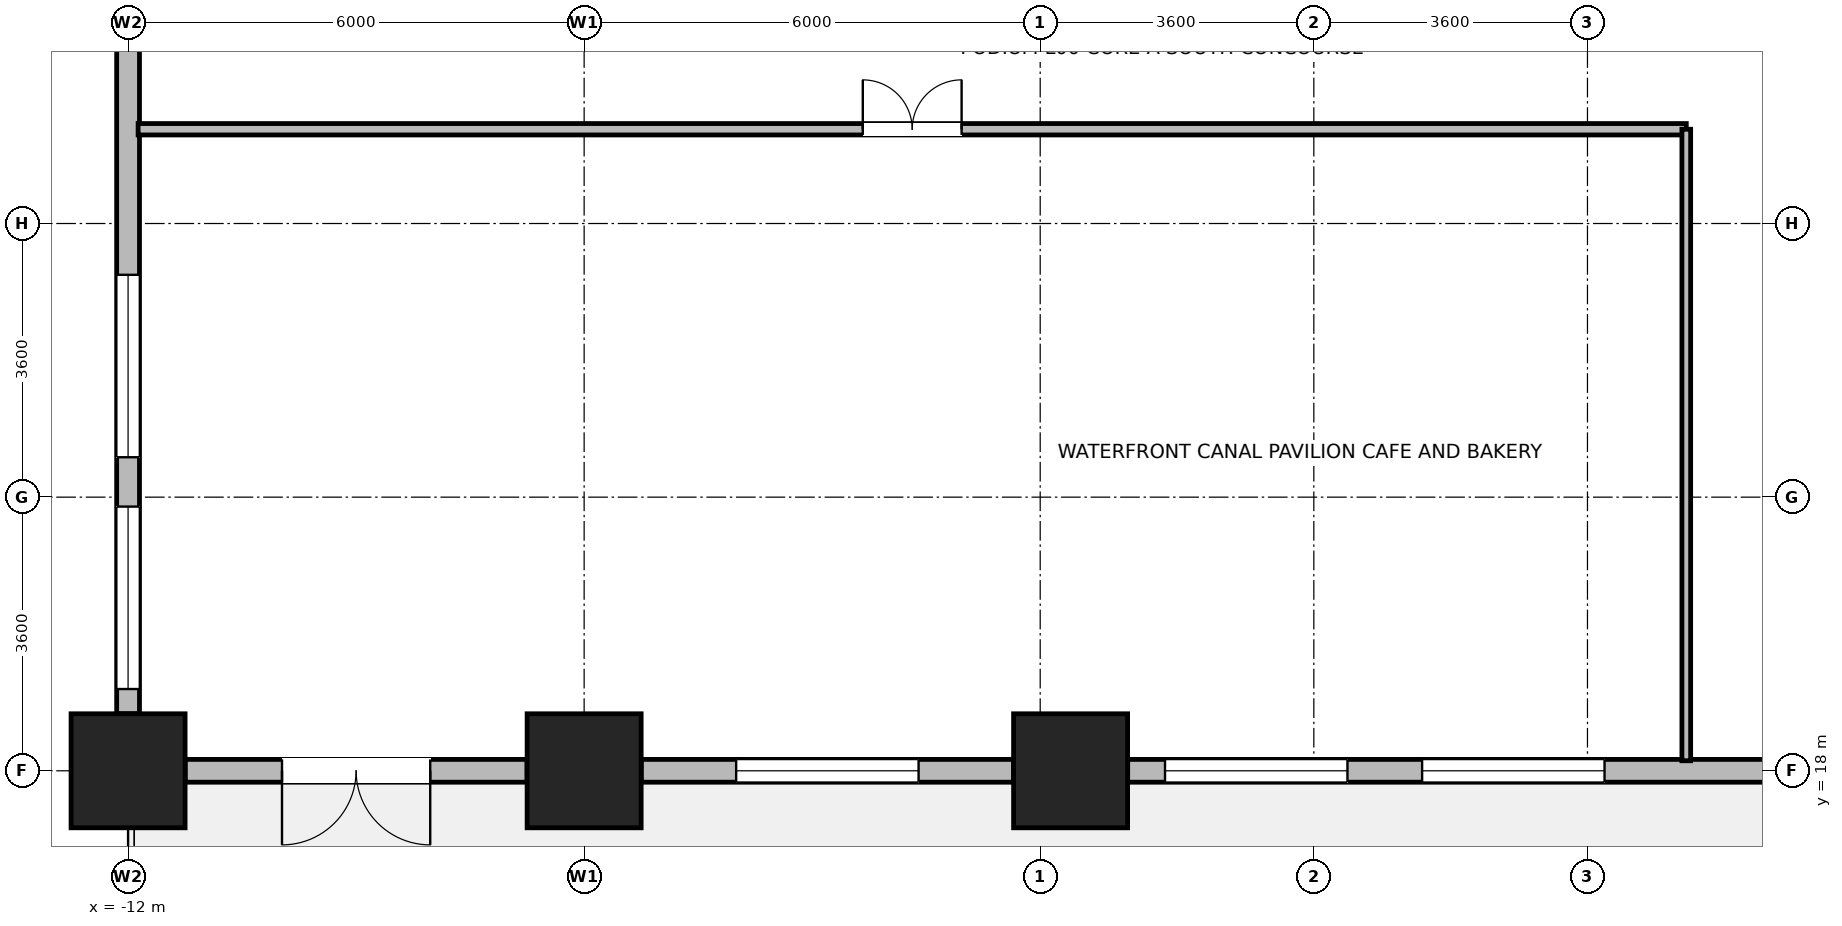
"""IFC4 building model, lengths in metres.
Left out: names, types, materials, properties, quantities, classifications, styles, units other than length and angle.
Written with IfcOpenShell. Run it as: python <this file> out.ifc"""

import sys

from ifc_helpers import new_model, si_unit, direction, frame, frame_2d, origin, origin_2d, place, context, subcontext, project, spatial, rectangle, extrude, source, transform, mapped, element, fill, save


model = new_model("IFC4")
c1 = context("Model", 3, precision=1e-05, world=origin(), true_north=direction((0.0, 1.0)))
c2 = subcontext(c1, "Body", "Model", "MODEL_VIEW")
j1 = project(units=[si_unit("LENGTHUNIT", "METRE"), si_unit("PLANEANGLEUNIT", "RADIAN")], contexts=[c1])
p1 = place(None, origin())
s1 = spatial("IfcSite", under=j1, at=p1, CompositionType="ELEMENT")
p2 = place(p1, origin())
s2 = spatial("IfcBuilding", under=s1, at=p2, CompositionType="ELEMENT")
p3 = place(p2, origin())
s3 = spatial("IfcBuildingStorey", under=s2, at=p3, CompositionType="ELEMENT", Elevation=0.0)
m1 = source(origin(), c2, "Body", "SweptSolid", [
    extrude(rectangle(XDim=1.5, YDim=1.5, at=origin_2d()), origin(), (0.0, 0.0, 1.0), 5.4),
])
for number, where, z_axis, x_axis in (
    (1, (0.4, 18.0, 0.0), (0.0, 0.0, 1.0), (1.0, 0.0, 0.0)),
    (2, (-12.0, 18.0, 0.0), (0.0, 0.0, 1.0), (1.0, 0.0, 0.0)),
    (3, (-6.0, 18.0, 0.0), (0.0, 0.0, 1.0), (1.0, 0.0, 0.0)),
):
    element("IfcColumn", number, at=place(p3, frame(where, z_axis=z_axis, x_axis=x_axis)), inside=s3, PredefinedType="COLUMN", context=c2, shape_type="MappedRepresentation", body=[
        mapped(m1, transform((0.0, 0.0, 0.0), x_axis=(1.0, 0.0, 0.0), y_axis=(0.0, 1.0, 0.0), z_axis=(0.0, 0.0, 1.0), scale=1.0)),
    ])
p4 = place(p3, frame((-12.0, 18.751, 0.0), z_axis=(0.0, 0.0, 1.0), x_axis=(0.0, 1.0, 0.0)))
e4 = element("IfcWall", 4, at=p4, inside=s3, PredefinedType="STANDARD", context=c2, shape_type="SweptSolid", body=[
    extrude(rectangle(XDim=9.148, YDim=0.3, at=frame_2d((4.574, 0.0))), origin(), (0.0, 0.0, 1.0), 4.5),
])
p5 = place(p4, frame((0.325, 0.0, 0.9)))
e5 = element("IfcOpeningElement", 5, at=p5, cuts=e4, PredefinedType="OPENING", context=c2, shape_type="SweptSolid", body=[
    extrude(rectangle(XDim=2.4, YDim=2.5, at=frame_2d((1.2, 1.25))), frame((0.0, 0.16, 0.0), z_axis=(0.0, -1.0, 0.0), x_axis=(1.0, 0.0, 0.0)), (0.0, 0.0, 1.0), 0.32),
])
p6 = place(p4, frame((3.374, 0.0, 0.9)))
e6 = element("IfcOpeningElement", 6, at=p6, cuts=e4, PredefinedType="OPENING", context=c2, shape_type="SweptSolid", body=[
    extrude(rectangle(XDim=2.4, YDim=2.5, at=frame_2d((1.2, 1.25))), frame((0.0, 0.16, 0.0), z_axis=(0.0, -1.0, 0.0), x_axis=(1.0, 0.0, 0.0)), (0.0, 0.0, 1.0), 0.32),
])
p7 = place(p3, frame((-6.751, 18.0, 0.0), z_axis=(0.0, 0.0, 1.0), x_axis=(-1.0, 0.0, 0.0)))
e7 = element("IfcWall", 7, at=p7, inside=s3, PredefinedType="STANDARD", context=c2, shape_type="SweptSolid", body=[
    extrude(rectangle(XDim=4.498, YDim=0.3, at=frame_2d((2.249, 0.0))), origin(), (0.0, 0.0, 1.0), 4.4),
])
p8 = place(p7, frame((1.274, 0.0, 0.0)))
e8 = element("IfcOpeningElement", 8, at=p8, cuts=e7, PredefinedType="OPENING", context=c2, shape_type="SweptSolid", body=[
    extrude(rectangle(XDim=1.95, YDim=2.4, at=frame_2d((0.975, 1.2))), frame((0.0, 0.16, 0.0), z_axis=(0.0, -1.0, 0.0), x_axis=(1.0, 0.0, 0.0)), (0.0, 0.0, 1.0), 0.32),
])
p9 = place(p3, frame((-0.351, 18.0, 0.0), z_axis=(0.0, 0.0, 1.0), x_axis=(-1.0, 0.0, 0.0)))
e9 = element("IfcWall", 9, at=p9, inside=s3, PredefinedType="STANDARD", context=c2, shape_type="SweptSolid", body=[
    extrude(rectangle(XDim=4.898, YDim=0.3, at=frame_2d((2.449, 0.0))), origin(), (0.0, 0.0, 1.0), 4.4),
])
p10 = place(p9, frame((1.249, 0.0, 0.9)))
e10 = element("IfcOpeningElement", 10, at=p10, cuts=e9, PredefinedType="OPENING", context=c2, shape_type="SweptSolid", body=[
    extrude(rectangle(XDim=2.4, YDim=2.5, at=frame_2d((1.2, 1.25))), frame((0.0, 0.16, 0.0), z_axis=(0.0, -1.0, 0.0), x_axis=(1.0, 0.0, 0.0)), (0.0, 0.0, 1.0), 0.32),
])
p11 = place(p3, frame((21.445, 18.0, 0.0), z_axis=(0.0, 0.0, 1.0), x_axis=(-1.0, 0.0, 0.0)))
e11 = element("IfcWall", 11, at=p11, inside=s3, PredefinedType="STANDARD", context=c2, shape_type="SweptSolid", body=[
    extrude(rectangle(XDim=20.294, YDim=0.3, at=frame_2d((10.147, 0.0))), origin(), (0.0, 0.0, 1.0), 5.1),
])
p12 = place(p11, frame((4.02, 0.0, 0.0)))
e12 = element("IfcOpeningElement", 12, at=p12, cuts=e11, PredefinedType="OPENING", context=c2, shape_type="SweptSolid", body=[
    extrude(rectangle(XDim=1.85, YDim=2.25, at=frame_2d((0.925, 1.125))), frame((0.0, 0.16, 0.0), z_axis=(0.0, -1.0, 0.0), x_axis=(1.0, 0.0, 0.0)), (0.0, 0.0, 1.0), 0.32),
])
p13 = place(p11, frame((1.12, 0.0, 0.0)))
e13 = element("IfcOpeningElement", 13, at=p13, cuts=e11, PredefinedType="OPENING", context=c2, shape_type="SweptSolid", body=[
    extrude(rectangle(XDim=1.95, YDim=2.4, at=frame_2d((0.975, 1.2))), frame((0.0, 0.16, 0.0), z_axis=(0.0, -1.0, 0.0), x_axis=(1.0, 0.0, 0.0)), (0.0, 0.0, 1.0), 0.32),
])
p14 = place(p11, frame((7.256, 0.0, 0.9)))
e14 = element("IfcOpeningElement", 14, at=p14, cuts=e11, PredefinedType="OPENING", context=c2, shape_type="SweptSolid", body=[
    extrude(rectangle(XDim=2.4, YDim=2.5, at=frame_2d((1.2, 1.25))), frame((0.0, 0.16, 0.0), z_axis=(0.0, -1.0, 0.0), x_axis=(1.0, 0.0, 0.0)), (0.0, 0.0, 1.0), 0.32),
])
p15 = place(p11, frame((14.021, 0.0, 0.9)))
e15 = element("IfcOpeningElement", 15, at=p15, cuts=e11, PredefinedType="OPENING", context=c2, shape_type="SweptSolid", body=[
    extrude(rectangle(XDim=2.4, YDim=2.5, at=frame_2d((1.2, 1.25))), frame((0.0, 0.16, 0.0), z_axis=(0.0, -1.0, 0.0), x_axis=(1.0, 0.0, 0.0)), (0.0, 0.0, 1.0), 0.32),
])
p16 = place(p11, frame((17.403, 0.0, 0.9)))
e16 = element("IfcOpeningElement", 16, at=p16, cuts=e11, PredefinedType="OPENING", context=c2, shape_type="SweptSolid", body=[
    extrude(rectangle(XDim=2.4, YDim=2.5, at=frame_2d((1.2, 1.25))), frame((0.0, 0.16, 0.0), z_axis=(0.0, -1.0, 0.0), x_axis=(1.0, 0.0, 0.0)), (0.0, 0.0, 1.0), 0.32),
])
p17 = place(p3, frame((-11.868, 26.44, 0.0), z_axis=(0.0, 0.0, 1.0), x_axis=(1.0, 0.0, 0.0)))
e17 = element("IfcWall", 17, at=p17, inside=s3, PredefinedType="PARTITIONING", context=c2, shape_type="SweptSolid", body=[
    extrude(rectangle(XDim=20.368, YDim=0.15, at=frame_2d((10.184, 0.0))), origin(), (0.0, 0.0, 1.0), 5.1),
])
p18 = place(p17, frame((9.534, 0.0, 0.0)))
e18 = element("IfcOpeningElement", 18, at=p18, cuts=e17, PredefinedType="OPENING", context=c2, shape_type="SweptSolid", body=[
    extrude(rectangle(XDim=1.3, YDim=2.12, at=frame_2d((0.65, 1.06))), frame((0.0, 0.085, 0.0), z_axis=(0.0, -1.0, 0.0), x_axis=(1.0, 0.0, 0.0)), (0.0, 0.0, 1.0), 0.17),
])
p19 = place(p3, frame((8.5, 18.132, 0.0), z_axis=(0.0, 0.0, 1.0), x_axis=(0.0, 1.0, 0.0)))
e19 = element("IfcWall", 19, at=p19, inside=s3, PredefinedType="PARTITIONING", context=c2, shape_type="SweptSolid", body=[
    extrude(rectangle(XDim=8.308, YDim=0.115, at=frame_2d((4.154, 0.0))), origin(), (0.0, 0.0, 1.0), 5.1),
])
p20 = place(p5, origin())
e20 = element("IfcWindow", 20, at=p20, inside=s3, PartitioningType="SINGLE_PANEL", PredefinedType="WINDOW", context=c2, shape_type="SweptSolid", body=[
    extrude(rectangle(XDim=2.4, YDim=2.5, at=frame_2d((1.2, 1.25))), frame((0.0, 0.03, 0.0), z_axis=(0.0, -1.0, 0.0), x_axis=(1.0, 0.0, 0.0)), (0.0, 0.0, 1.0), 0.06),
])
fill(e5, e20)
p21 = place(p6, origin())
e21 = element("IfcWindow", 21, at=p21, inside=s3, PartitioningType="SINGLE_PANEL", PredefinedType="WINDOW", context=c2, shape_type="SweptSolid", body=[
    extrude(rectangle(XDim=2.4, YDim=2.5, at=frame_2d((1.2, 1.25))), frame((0.0, 0.03, 0.0), z_axis=(0.0, -1.0, 0.0), x_axis=(1.0, 0.0, 0.0)), (0.0, 0.0, 1.0), 0.06),
])
fill(e6, e21)
p22 = place(p8, origin())
e22 = element("IfcDoor", 22, at=p22, inside=s3, OperationType="DOUBLE_DOOR_SINGLE_SWING", PredefinedType="DOOR", context=c2, shape_type="SweptSolid", body=[
    extrude(rectangle(XDim=1.95, YDim=2.4, at=frame_2d((0.975, 1.2))), frame((0.0, 0.025, 0.0), z_axis=(0.0, -1.0, 0.0), x_axis=(1.0, 0.0, 0.0)), (0.0, 0.0, 1.0), 0.05),
])
fill(e8, e22)
p23 = place(p10, origin())
e23 = element("IfcWindow", 23, at=p23, inside=s3, PartitioningType="SINGLE_PANEL", PredefinedType="WINDOW", context=c2, shape_type="SweptSolid", body=[
    extrude(rectangle(XDim=2.4, YDim=2.5, at=frame_2d((1.2, 1.25))), frame((0.0, 0.03, 0.0), z_axis=(0.0, -1.0, 0.0), x_axis=(1.0, 0.0, 0.0)), (0.0, 0.0, 1.0), 0.06),
])
fill(e10, e23)
p24 = place(p15, origin())
e24 = element("IfcWindow", 24, at=p24, inside=s3, PartitioningType="SINGLE_PANEL", PredefinedType="WINDOW", context=c2, shape_type="SweptSolid", body=[
    extrude(rectangle(XDim=2.4, YDim=2.5, at=frame_2d((1.2, 1.25))), frame((0.0, 0.03, 0.0), z_axis=(0.0, -1.0, 0.0), x_axis=(1.0, 0.0, 0.0)), (0.0, 0.0, 1.0), 0.06),
])
fill(e15, e24)
p25 = place(p16, origin())
e25 = element("IfcWindow", 25, at=p25, inside=s3, PartitioningType="SINGLE_PANEL", PredefinedType="WINDOW", context=c2, shape_type="SweptSolid", body=[
    extrude(rectangle(XDim=2.4, YDim=2.5, at=frame_2d((1.2, 1.25))), frame((0.0, 0.03, 0.0), z_axis=(0.0, -1.0, 0.0), x_axis=(1.0, 0.0, 0.0)), (0.0, 0.0, 1.0), 0.06),
])
fill(e16, e25)
p26 = place(p18, origin())
e26 = element("IfcDoor", 26, at=p26, inside=s3, OperationType="DOUBLE_DOOR_SINGLE_SWING", PredefinedType="DOOR", context=c2, shape_type="SweptSolid", body=[
    extrude(rectangle(XDim=1.3, YDim=2.12, at=frame_2d((0.65, 1.06))), frame((0.0, 0.025, 0.0), z_axis=(0.0, -1.0, 0.0), x_axis=(1.0, 0.0, 0.0)), (0.0, 0.0, 1.0), 0.05),
])
fill(e18, e26)
save(model, sys.argv[1])
